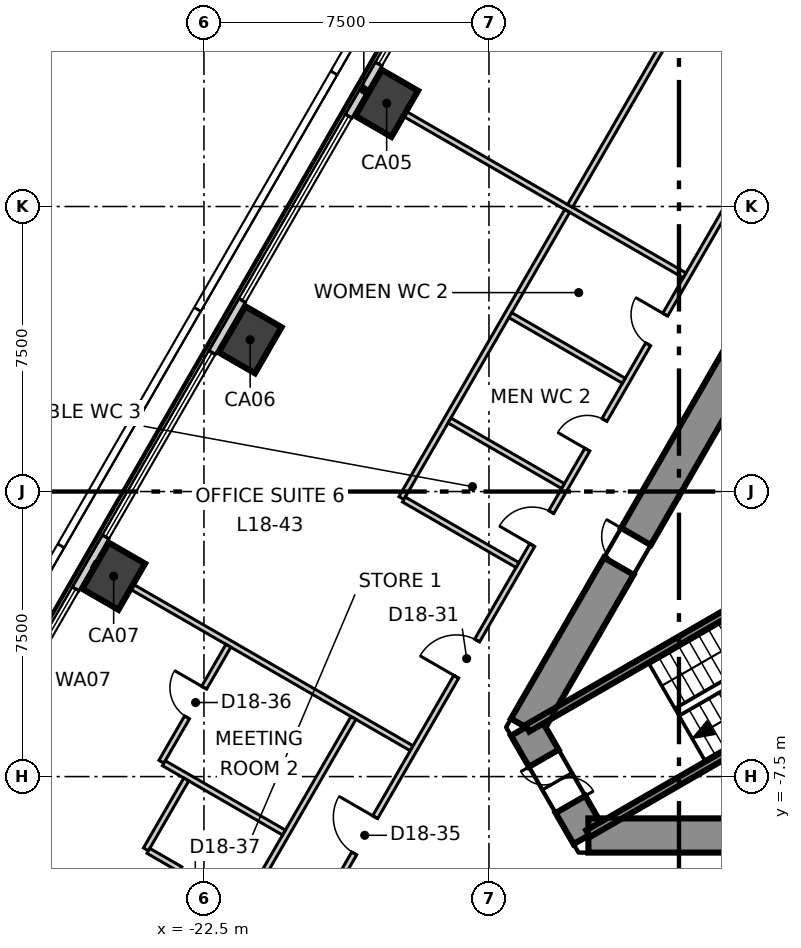
"""IFC4 building model, lengths in metres.
Left out: names, types, materials, properties, quantities, classifications, styles, units other than length and angle.
Written with IfcOpenShell. Run it as: python <this file> out.ifc"""

import sys

from ifc_helpers import new_model, si_unit, direction, frame, frame_2d, origin, origin_2d, place, context, subcontext, project, spatial, polyline, rectangle, outline, extrude, element, fill, save


model = new_model("IFC4")
c1 = context("Model", 3, precision=1e-05, world=origin(), true_north=direction((0.0, 1.0)))
c2 = subcontext(c1, "Body", "Model", "MODEL_VIEW")
j1 = project(units=[si_unit("LENGTHUNIT", "METRE"), si_unit("PLANEANGLEUNIT", "RADIAN")], contexts=[c1])
p1 = place(None, origin())
s1 = spatial("IfcSite", under=j1, at=p1, CompositionType="ELEMENT")
p2 = place(p1, origin())
s2 = spatial("IfcBuilding", under=s1, at=p2, CompositionType="ELEMENT")
p3 = place(p2, frame((0.0, 0.0, 83.3)))
s3 = spatial("IfcBuildingStorey", under=s2, at=p3, CompositionType="ELEMENT", Elevation=83.3)
p4 = place(p3, frame((-1.645, 15.25, -0.3), z_axis=(0.0, 0.0, 1.0), x_axis=(-0.500026485275, -0.866010111964, 0.0)))
e1 = element("IfcWall", 1, at=p4, inside=s3, PredefinedType="SHEAR", context=c2, shape_type="SweptSolid", body=[
    extrude(outline(polyline([(-0.26, -0.45), (1.685, -0.45), (3.63, -0.45), (5.576, -0.45), (7.521, -0.45), (9.466, -0.449), (11.411, -0.449), (13.357, -0.449), (15.302, -0.449), (17.247, -0.449), (19.192, -0.449), (21.138, -0.449), (23.083, -0.449), (25.028, -0.449), (24.509, 0.45), (22.644, 0.45), (20.778, 0.45), (18.913, 0.45), (17.048, 0.45), (15.182, 0.449), (13.317, 0.449), (11.452, 0.449), (9.587, 0.449), (7.721, 0.449), (5.856, 0.449), (3.991, 0.449), (2.125, 0.449), (0.26, 0.449), (-0.26, -0.45)])), origin(), (0.0, 0.0, 1.0), 4.0),
])
p5 = place(p4, frame((11.834, 0.0, 0.3)))
e2 = element("IfcOpeningElement", 2, at=p5, cuts=e1, PredefinedType="OPENING", context=c2, shape_type="SweptSolid", body=[
    extrude(rectangle(XDim=1.1, YDim=2.1, at=frame_2d((0.55, 1.05))), frame((0.0, 0.46, 0.0), z_axis=(0.0, -1.0, 0.0), x_axis=(1.0, 0.0, 0.0)), (0.0, 0.0, 1.0), 0.92),
])
p6 = place(p4, frame((18.976, 0.0, 0.3)))
e3 = element("IfcOpeningElement", 3, at=p6, cuts=e1, PredefinedType="OPENING", context=c2, shape_type="SweptSolid", body=[
    extrude(rectangle(XDim=0.9, YDim=2.1, at=frame_2d((0.45, 1.05))), frame((0.0, 0.46, 0.0), z_axis=(0.0, -1.0, 0.0), x_axis=(1.0, 0.0, 0.0)), (0.0, 0.0, 1.0), 0.92),
])
p7 = place(p3, frame((-14.03, -6.2, -0.3), z_axis=(0.0, 0.0, 1.0), x_axis=(0.500111984565, -0.865960739811, 0.0)))
e4 = element("IfcWall", 4, at=p7, inside=s3, PredefinedType="SHEAR", context=c2, shape_type="SweptSolid", body=[
    extrude(outline(polyline([(-0.26, -0.449), (1.646, -0.449), (3.551, -0.45), (3.032, 0.45), (1.646, 0.45), (0.26, 0.45), (-0.26, -0.449)])), origin(), (0.0, 0.0, 1.0), 4.0),
])
p8 = place(p7, frame((0.946, 0.0, 0.3)))
e5 = element("IfcOpeningElement", 5, at=p8, cuts=e4, PredefinedType="OPENING", context=c2, shape_type="SweptSolid", body=[
    extrude(rectangle(XDim=1.4, YDim=2.1, at=frame_2d((0.7, 1.05))), frame((0.0, 0.46, 0.0), z_axis=(0.0, -1.0, 0.0), x_axis=(1.0, 0.0, 0.0)), (0.0, 0.0, 1.0), 0.92),
])
p9 = place(p3, frame((-12.384, -9.05, -0.3), z_axis=(0.0, 0.0, 1.0), x_axis=(1.0, 0.0, 0.0)))
e6 = element("IfcWall", 6, at=p9, inside=s3, PredefinedType="SHEAR", context=c2, shape_type="SweptSolid", body=[
    extrude(outline(polyline([(-0.26, -0.45), (1.685, -0.45), (3.63, -0.45), (5.576, -0.45), (7.521, -0.45), (9.466, -0.45), (11.411, -0.45), (13.357, -0.45), (15.302, -0.45), (17.247, -0.45), (19.192, -0.45), (21.138, -0.45), (23.083, -0.45), (25.028, -0.45), (24.508, 0.45), (22.643, 0.45), (20.778, 0.45), (18.912, 0.45), (17.047, 0.45), (15.182, 0.45), (13.317, 0.45), (11.451, 0.45), (9.586, 0.45), (7.721, 0.45), (5.856, 0.45), (3.99, 0.45), (2.125, 0.45), (0.26, 0.45), (-0.26, -0.45)])), origin(), (0.0, 0.0, 1.0), 4.0),
])
p10 = place(p9, frame((4.05, 0.0, 0.3)))
e7 = element("IfcOpeningElement", 7, at=p10, cuts=e6, PredefinedType="OPENING", context=c2, shape_type="SweptSolid", body=[
    extrude(rectangle(XDim=0.9, YDim=2.1, at=frame_2d((0.45, 1.05))), frame((0.0, 0.46, 0.0), z_axis=(0.0, -1.0, 0.0), x_axis=(1.0, 0.0, 0.0)), (0.0, 0.0, 1.0), 0.92),
])
p11 = place(p9, frame((15.32, 0.0, 0.3)))
e8 = element("IfcOpeningElement", 8, at=p11, cuts=e6, PredefinedType="OPENING", context=c2, shape_type="SweptSolid", body=[
    extrude(rectangle(XDim=0.9, YDim=2.1, at=frame_2d((0.45, 1.05))), frame((0.0, 0.46, 0.0), z_axis=(0.0, -1.0, 0.0), x_axis=(1.0, 0.0, 0.0)), (0.0, 0.0, 1.0), 0.92),
])
for number, where, z_axis, x_axis in (
    (9, (-17.692, 10.214, -0.3), (0.0, 0.0, 1.0), (0.5, 0.866, 0.0)),
    (10, (-21.284, 3.993, -0.3), (0.0, 0.0, 1.0), (0.5, 0.866, 0.0)),
    (11, (-24.876, -2.228, -0.3), (0.0, 0.0, 1.0), (0.5, 0.866, 0.0)),
):
    element("IfcColumn", number, at=place(p3, frame(where, z_axis=z_axis, x_axis=x_axis)), inside=s3, PredefinedType="COLUMN", context=c2, shape_type="SweptSolid", body=[
        extrude(rectangle(XDim=1.4, YDim=1.1, at=origin_2d()), origin(), (0.0, 0.0, 1.0), 4.0),
    ])
p12 = place(p3, frame((-3.28, 36.577, 0.0), z_axis=(0.0, 0.0, 1.0), x_axis=(-0.500001635065, -0.866024459777, 0.0)))
e12 = element("IfcWall", 12, at=p12, inside=s3, PredefinedType="ELEMENTEDWALL", context=c2, shape_type="SweptSolid", body=[
    extrude(rectangle(XDim=60.053, YDim=0.2, at=frame_2d((30.027, 0.0))), origin(), (0.0, 0.0, 1.0), 3.7),
])
p13 = place(p12, frame((2.094, 0.0, 0.9)))
e13 = element("IfcOpeningElement", 13, at=p13, cuts=e12, PredefinedType="OPENING", context=c2, shape_type="SweptSolid", body=[
    extrude(rectangle(XDim=5.6, YDim=2.5, at=frame_2d((2.8, 1.25))), frame((0.0, 0.11, 0.0), z_axis=(0.0, -1.0, 0.0), x_axis=(1.0, 0.0, 0.0)), (0.0, 0.0, 1.0), 0.22),
])
p14 = place(p12, frame((9.278, 0.0, 0.9)))
e14 = element("IfcOpeningElement", 14, at=p14, cuts=e12, PredefinedType="OPENING", context=c2, shape_type="SweptSolid", body=[
    extrude(rectangle(XDim=5.6, YDim=2.5, at=frame_2d((2.8, 1.25))), frame((0.0, 0.11, 0.0), z_axis=(0.0, -1.0, 0.0), x_axis=(1.0, 0.0, 0.0)), (0.0, 0.0, 1.0), 0.22),
])
p15 = place(p12, frame((16.461, 0.0, 0.9)))
e15 = element("IfcOpeningElement", 15, at=p15, cuts=e12, PredefinedType="OPENING", context=c2, shape_type="SweptSolid", body=[
    extrude(rectangle(XDim=5.6, YDim=2.5, at=frame_2d((2.8, 1.25))), frame((0.0, 0.11, 0.0), z_axis=(0.0, -1.0, 0.0), x_axis=(1.0, 0.0, 0.0)), (0.0, 0.0, 1.0), 0.22),
])
p16 = place(p12, frame((23.645, 0.0, 0.9)))
e16 = element("IfcOpeningElement", 16, at=p16, cuts=e12, PredefinedType="OPENING", context=c2, shape_type="SweptSolid", body=[
    extrude(rectangle(XDim=5.6, YDim=2.5, at=frame_2d((2.8, 1.25))), frame((0.0, 0.11, 0.0), z_axis=(0.0, -1.0, 0.0), x_axis=(1.0, 0.0, 0.0)), (0.0, 0.0, 1.0), 0.22),
])
p17 = place(p12, frame((30.828, 0.0, 0.9)))
e17 = element("IfcOpeningElement", 17, at=p17, cuts=e12, PredefinedType="OPENING", context=c2, shape_type="SweptSolid", body=[
    extrude(rectangle(XDim=5.6, YDim=2.5, at=frame_2d((2.8, 1.25))), frame((0.0, 0.11, 0.0), z_axis=(0.0, -1.0, 0.0), x_axis=(1.0, 0.0, 0.0)), (0.0, 0.0, 1.0), 0.22),
])
p18 = place(p12, frame((38.012, 0.0, 0.9)))
e18 = element("IfcOpeningElement", 18, at=p18, cuts=e12, PredefinedType="OPENING", context=c2, shape_type="SweptSolid", body=[
    extrude(rectangle(XDim=5.6, YDim=2.5, at=frame_2d((2.8, 1.25))), frame((0.0, 0.11, 0.0), z_axis=(0.0, -1.0, 0.0), x_axis=(1.0, 0.0, 0.0)), (0.0, 0.0, 1.0), 0.22),
])
p19 = place(p12, frame((45.195, 0.0, 0.9)))
e19 = element("IfcOpeningElement", 19, at=p19, cuts=e12, PredefinedType="OPENING", context=c2, shape_type="SweptSolid", body=[
    extrude(rectangle(XDim=5.6, YDim=2.5, at=frame_2d((2.8, 1.25))), frame((0.0, 0.11, 0.0), z_axis=(0.0, -1.0, 0.0), x_axis=(1.0, 0.0, 0.0)), (0.0, 0.0, 1.0), 0.22),
])
p20 = place(p12, frame((52.379, 0.0, 0.9)))
e20 = element("IfcOpeningElement", 20, at=p20, cuts=e12, PredefinedType="OPENING", context=c2, shape_type="SweptSolid", body=[
    extrude(rectangle(XDim=5.6, YDim=2.5, at=frame_2d((2.8, 1.25))), frame((0.0, 0.11, 0.0), z_axis=(0.0, -1.0, 0.0), x_axis=(1.0, 0.0, 0.0)), (0.0, 0.0, 1.0), 0.22),
])
p21 = place(p3, frame((-25.413, -1.918, 0.0), z_axis=(0.0, 0.0, 1.0), x_axis=(0.866035557451, -0.499982412921, 0.0)))
e21 = element("IfcWall", 21, at=p21, inside=s3, PredefinedType="PARTITIONING", context=c2, shape_type="SweptSolid", body=[
    extrude(rectangle(XDim=9.674, YDim=0.15, at=frame_2d((4.837, 0.0))), origin(), (0.0, 0.0, 1.0), 3.7),
])
p22 = place(p3, frame((-19.497, -11.17, 0.0), z_axis=(0.0, 0.0, 1.0), x_axis=(0.499998854553, 0.866026065108, 0.0)))
e22 = element("IfcWall", 22, at=p22, inside=s3, PredefinedType="PARTITIONING", context=c2, shape_type="SweptSolid", body=[
    extrude(rectangle(XDim=38.994, YDim=0.15, at=frame_2d((19.497, 0.0))), origin(), (0.0, 0.0, 1.0), 3.7),
])
p23 = place(p22, frame((35.844, 0.0, 0.0)))
e23 = element("IfcOpeningElement", 23, at=p23, cuts=e22, PredefinedType="OPENING", context=c2, shape_type="SweptSolid", body=[
    extrude(rectangle(XDim=1.1, YDim=2.1, at=frame_2d((0.55, 1.05))), frame((0.0, 0.085, 0.0), z_axis=(0.0, -1.0, 0.0), x_axis=(1.0, 0.0, 0.0)), (0.0, 0.0, 1.0), 0.17),
])
p24 = place(p22, frame((26.04, 0.0, 0.0)))
e24 = element("IfcOpeningElement", 24, at=p24, cuts=e22, PredefinedType="OPENING", context=c2, shape_type="SweptSolid", body=[
    extrude(rectangle(XDim=1.1, YDim=2.1, at=frame_2d((0.55, 1.05))), frame((0.0, 0.085, 0.0), z_axis=(0.0, -1.0, 0.0), x_axis=(1.0, 0.0, 0.0)), (0.0, 0.0, 1.0), 0.17),
])
p25 = place(p22, frame((7.272, 0.0, 0.0)))
e25 = element("IfcOpeningElement", 25, at=p25, cuts=e22, PredefinedType="OPENING", context=c2, shape_type="SweptSolid", body=[
    extrude(rectangle(XDim=1.1, YDim=2.1, at=frame_2d((0.55, 1.05))), frame((0.0, 0.085, 0.0), z_axis=(0.0, -1.0, 0.0), x_axis=(1.0, 0.0, 0.0)), (0.0, 0.0, 1.0), 0.17),
])
p26 = place(p22, frame((17.372, 0.0, 0.0)))
e26 = element("IfcOpeningElement", 26, at=p26, cuts=e22, PredefinedType="OPENING", context=c2, shape_type="SweptSolid", body=[
    extrude(rectangle(XDim=0.9, YDim=2.1, at=frame_2d((0.45, 1.05))), frame((0.0, 0.085, 0.0), z_axis=(0.0, -1.0, 0.0), x_axis=(1.0, 0.0, 0.0)), (0.0, 0.0, 1.0), 0.17),
])
p27 = place(p22, frame((14.172, 0.0, 0.0)))
e27 = element("IfcOpeningElement", 27, at=p27, cuts=e22, PredefinedType="OPENING", context=c2, shape_type="SweptSolid", body=[
    extrude(rectangle(XDim=0.9, YDim=2.1, at=frame_2d((0.45, 1.05))), frame((0.0, 0.085, 0.0), z_axis=(0.0, -1.0, 0.0), x_axis=(1.0, 0.0, 0.0)), (0.0, 0.0, 1.0), 0.17),
])
p28 = place(p22, frame((11.272, 0.0, 0.0)))
e28 = element("IfcOpeningElement", 28, at=p28, cuts=e22, PredefinedType="OPENING", context=c2, shape_type="SweptSolid", body=[
    extrude(rectangle(XDim=1.0, YDim=2.1, at=frame_2d((0.5, 1.05))), frame((0.0, 0.085, 0.0), z_axis=(0.0, -1.0, 0.0), x_axis=(1.0, 0.0, 0.0)), (0.0, 0.0, 1.0), 0.17),
])
p29 = place(p22, frame((1.904, 0.0, 0.0)))
e29 = element("IfcOpeningElement", 29, at=p29, cuts=e22, PredefinedType="OPENING", context=c2, shape_type="SweptSolid", body=[
    extrude(rectangle(XDim=1.1, YDim=2.1, at=frame_2d((0.55, 1.05))), frame((0.0, 0.085, 0.0), z_axis=(0.0, -1.0, 0.0), x_axis=(1.0, 0.0, 0.0)), (0.0, 0.0, 1.0), 0.17),
])
p30 = place(p3, frame((-18.229, 10.524, 0.0), z_axis=(0.0, 0.0, 1.0), x_axis=(0.866029248602, -0.499993340521, 0.0)))
e30 = element("IfcWall", 30, at=p30, inside=s3, PredefinedType="PARTITIONING", context=c2, shape_type="SweptSolid", body=[
    extrude(rectangle(XDim=9.674, YDim=0.15, at=frame_2d((4.837, 0.0))), origin(), (0.0, 0.0, 1.0), 3.2),
])
p31 = place(p3, frame((-17.304, -0.171, 0.0), z_axis=(0.0, 0.0, 1.0), x_axis=(0.500054279689, 0.865994063124, 0.0)))
e31 = element("IfcWall", 31, at=p31, inside=s3, PredefinedType="PARTITIONING", context=c2, shape_type="SweptSolid", body=[
    extrude(rectangle(XDim=8.725, YDim=0.15, at=frame_2d((4.363, 0.0))), origin(), (0.0, 0.0, 1.0), 3.7),
])
for number, where, z_axis, x_axis in (
    (32, (-17.239, -0.209, 0.0), (0.0, 0.0, 1.0), (0.866, -0.5, 0.0)),
    (33, (-16.039, 1.87, 0.0), (0.0, 0.0, 1.0), (0.866, -0.5, 0.0)),
    (34, (-14.439, 4.641, 0.0), (0.0, 0.0, 1.0), (0.866, -0.5, 0.0)),
):
    element("IfcWall", number, at=place(p3, frame(where, z_axis=z_axis, x_axis=x_axis)), inside=s3, PredefinedType="PARTITIONING", context=c2, shape_type="SweptSolid", body=[
        extrude(rectangle(XDim=3.45, YDim=0.15, at=frame_2d((1.725, 0.0))), origin(), (0.0, 0.0, 1.0), 3.7),
    ])
p32 = place(p3, frame((-21.429, -10.916, 0.0), z_axis=(0.0, 0.0, 1.0), x_axis=(0.500069422629, 0.865985318901, 0.0)))
e35 = element("IfcWall", 35, at=p32, inside=s3, PredefinedType="PARTITIONING", context=c2, shape_type="SweptSolid", body=[
    extrude(rectangle(XDim=5.725, YDim=0.15, at=frame_2d((2.863, 0.0))), origin(), (0.0, 0.0, 1.0), 3.7),
])
p33 = place(p3, frame((-23.62, -7.11, 0.0), z_axis=(0.0, 0.0, 1.0), x_axis=(0.500236053335, 0.865889075427, 0.0)))
e36 = element("IfcWall", 36, at=p33, inside=s3, PredefinedType="PARTITIONING", context=c2, shape_type="SweptSolid", body=[
    extrude(rectangle(XDim=3.525, YDim=0.15, at=frame_2d((1.762, 0.0))), origin(), (0.0, 0.0, 1.0), 3.7),
])
p34 = place(p33, frame((1.35, 0.0, 0.0)))
e37 = element("IfcOpeningElement", 37, at=p34, cuts=e36, PredefinedType="OPENING", context=c2, shape_type="SweptSolid", body=[
    extrude(rectangle(XDim=0.9, YDim=2.1, at=frame_2d((0.45, 1.05))), frame((0.0, 0.085, 0.0), z_axis=(0.0, -1.0, 0.0), x_axis=(1.0, 0.0, 0.0)), (0.0, 0.0, 1.0), 0.17),
])
p35 = place(p3, frame((-23.555, -7.148, 0.0), z_axis=(0.0, 0.0, 1.0), x_axis=(0.866024069551, -0.500002310952, 0.0)))
e38 = element("IfcWall", 38, at=p35, inside=s3, PredefinedType="PARTITIONING", context=c2, shape_type="SweptSolid", body=[
    extrude(rectangle(XDim=3.65, YDim=0.15, at=frame_2d((1.825, 0.0))), origin(), (0.0, 0.0, 1.0), 3.7),
])
p36 = place(p3, frame((-24.027, -9.416, 0.0), z_axis=(0.0, 0.0, 1.0), x_axis=(0.500017365573, 0.866015377534, 0.0)))
e39 = element("IfcWall", 39, at=p36, inside=s3, PredefinedType="PARTITIONING", context=c2, shape_type="SweptSolid", body=[
    extrude(rectangle(XDim=2.126, YDim=0.15, at=frame_2d((1.063, 0.0))), origin(), (0.0, 0.0, 1.0), 3.7),
])
p37 = place(p3, frame((-23.962, -9.453, 0.0), z_axis=(0.0, 0.0, 1.0), x_axis=(0.866004402611, -0.500036373335, 0.0)))
e40 = element("IfcWall", 40, at=p37, inside=s3, PredefinedType="PARTITIONING", context=c2, shape_type="SweptSolid", body=[
    extrude(rectangle(XDim=2.85, YDim=0.15, at=frame_2d((1.425, 0.0))), origin(), (0.0, 0.0, 1.0), 3.7),
])
p38 = place(p37, frame((0.975, 0.0, 0.0)))
e41 = element("IfcOpeningElement", 41, at=p38, cuts=e40, PredefinedType="OPENING", context=c2, shape_type="SweptSolid", body=[
    extrude(rectangle(XDim=0.9, YDim=2.1, at=frame_2d((0.45, 1.05))), frame((0.0, 0.085, 0.0), z_axis=(0.0, -1.0, 0.0), x_axis=(1.0, 0.0, 0.0)), (0.0, 0.0, 1.0), 0.17),
])
p39 = place(p3, frame((-12.866, 7.515, 0.0), z_axis=(0.0, 0.0, 1.0), x_axis=(0.499947407797, 0.866055765778, 0.0)))
e42 = element("IfcWall", 42, at=p39, inside=s3, PredefinedType="PARTITIONING", context=c2, shape_type="SweptSolid", body=[
    extrude(rectangle(XDim=14.217, YDim=0.15, at=frame_2d((7.109, 0.0))), origin(), (0.0, 0.0, 1.0), 3.7),
])
p40 = place(p39, frame((6.642, 0.0, 0.0)))
e43 = element("IfcOpeningElement", 43, at=p40, cuts=e42, PredefinedType="OPENING", context=c2, shape_type="SweptSolid", body=[
    extrude(rectangle(XDim=1.0, YDim=2.1, at=frame_2d((0.5, 1.05))), frame((0.0, 0.085, 0.0), z_axis=(0.0, -1.0, 0.0), x_axis=(1.0, 0.0, 0.0)), (0.0, 0.0, 1.0), 0.17),
])
p41 = place(p3, frame((-13.99, -6.229, 0.0), z_axis=(0.0, 0.0, 1.0), x_axis=(0.866060059011, 0.499939970583, 0.0)))
e44 = element("IfcWall", 44, at=p41, inside=s3, PredefinedType="SOLIDWALL", context=c2, shape_type="SweptSolid", body=[
    extrude(rectangle(XDim=8.615, YDim=0.2, at=frame_2d((4.307, 0.0))), origin(), (0.0, 0.0, 1.0), 3.7),
])
p42 = place(p3, frame((-12.39, -9.001, 0.0), z_axis=(0.0, 0.0, 1.0), x_axis=(0.866010975815, 0.500024989144, 0.0)))
e45 = element("IfcWall", 45, at=p42, inside=s3, PredefinedType="SOLIDWALL", context=c2, shape_type="SweptSolid", body=[
    extrude(rectangle(XDim=8.615, YDim=0.2, at=frame_2d((4.308, 0.0))), origin(), (0.0, 0.0, 1.0), 3.7),
])
p43 = place(p16, origin())
e46 = element("IfcWindow", 46, at=p43, inside=s3, PartitioningType="SINGLE_PANEL", PredefinedType="WINDOW", context=c2, shape_type="SweptSolid", body=[
    extrude(rectangle(XDim=5.6, YDim=2.5, at=frame_2d((2.8, 1.25))), frame((0.0, 0.03, 0.0), z_axis=(0.0, -1.0, 0.0), x_axis=(1.0, 0.0, 0.0)), (0.0, 0.0, 1.0), 0.06),
])
fill(e16, e46)
p44 = place(p17, origin())
e47 = element("IfcWindow", 47, at=p44, inside=s3, PartitioningType="SINGLE_PANEL", PredefinedType="WINDOW", context=c2, shape_type="SweptSolid", body=[
    extrude(rectangle(XDim=5.6, YDim=2.5, at=frame_2d((2.8, 1.25))), frame((0.0, 0.03, 0.0), z_axis=(0.0, -1.0, 0.0), x_axis=(1.0, 0.0, 0.0)), (0.0, 0.0, 1.0), 0.06),
])
fill(e17, e47)
p45 = place(p18, origin())
e48 = element("IfcWindow", 48, at=p45, inside=s3, PartitioningType="SINGLE_PANEL", PredefinedType="WINDOW", context=c2, shape_type="SweptSolid", body=[
    extrude(rectangle(XDim=5.6, YDim=2.5, at=frame_2d((2.8, 1.25))), frame((0.0, 0.03, 0.0), z_axis=(0.0, -1.0, 0.0), x_axis=(1.0, 0.0, 0.0)), (0.0, 0.0, 1.0), 0.06),
])
fill(e18, e48)
p46 = place(p19, origin())
e49 = element("IfcWindow", 49, at=p46, inside=s3, PartitioningType="SINGLE_PANEL", PredefinedType="WINDOW", context=c2, shape_type="SweptSolid", body=[
    extrude(rectangle(XDim=5.6, YDim=2.5, at=frame_2d((2.8, 1.25))), frame((0.0, 0.03, 0.0), z_axis=(0.0, -1.0, 0.0), x_axis=(1.0, 0.0, 0.0)), (0.0, 0.0, 1.0), 0.06),
])
fill(e19, e49)
p47 = place(p25, origin())
e50 = element("IfcDoor", 50, at=p47, inside=s3, OperationType="SINGLE_SWING_RIGHT", PredefinedType="DOOR", context=c2, shape_type="SweptSolid", body=[
    extrude(rectangle(XDim=1.1, YDim=2.1, at=frame_2d((0.55, 1.05))), frame((0.0, 0.025, 0.0), z_axis=(0.0, -1.0, 0.0), x_axis=(1.0, 0.0, 0.0)), (0.0, 0.0, 1.0), 0.05),
])
fill(e25, e50)
p48 = place(p26, origin())
e51 = element("IfcDoor", 51, at=p48, inside=s3, OperationType="SINGLE_SWING_LEFT", PredefinedType="DOOR", context=c2, shape_type="SweptSolid", body=[
    extrude(rectangle(XDim=0.9, YDim=2.1, at=frame_2d((0.45, 1.05))), frame((0.0, 0.025, 0.0), z_axis=(0.0, -1.0, 0.0), x_axis=(1.0, 0.0, 0.0)), (0.0, 0.0, 1.0), 0.05),
])
fill(e26, e51)
p49 = place(p27, origin())
e52 = element("IfcDoor", 52, at=p49, inside=s3, OperationType="SINGLE_SWING_RIGHT", PredefinedType="DOOR", context=c2, shape_type="SweptSolid", body=[
    extrude(rectangle(XDim=0.9, YDim=2.1, at=frame_2d((0.45, 1.05))), frame((0.0, 0.025, 0.0), z_axis=(0.0, -1.0, 0.0), x_axis=(1.0, 0.0, 0.0)), (0.0, 0.0, 1.0), 0.05),
])
fill(e27, e52)
p50 = place(p28, origin())
e53 = element("IfcDoor", 53, at=p50, inside=s3, OperationType="SINGLE_SWING_RIGHT", PredefinedType="DOOR", context=c2, shape_type="SweptSolid", body=[
    extrude(rectangle(XDim=1.0, YDim=2.1, at=frame_2d((0.5, 1.05))), frame((0.0, 0.025, 0.0), z_axis=(0.0, -1.0, 0.0), x_axis=(1.0, 0.0, 0.0)), (0.0, 0.0, 1.0), 0.05),
])
fill(e28, e53)
p51 = place(p29, origin())
e54 = element("IfcDoor", 54, at=p51, inside=s3, OperationType="SINGLE_SWING_LEFT", PredefinedType="DOOR", context=c2, shape_type="SweptSolid", body=[
    extrude(rectangle(XDim=1.1, YDim=2.1, at=frame_2d((0.55, 1.05))), frame((0.0, 0.025, 0.0), z_axis=(0.0, -1.0, 0.0), x_axis=(1.0, 0.0, 0.0)), (0.0, 0.0, 1.0), 0.05),
])
fill(e29, e54)
p52 = place(p34, origin())
e55 = element("IfcDoor", 55, at=p52, inside=s3, OperationType="SINGLE_SWING_LEFT", PredefinedType="DOOR", context=c2, shape_type="SweptSolid", body=[
    extrude(rectangle(XDim=0.9, YDim=2.1, at=frame_2d((0.45, 1.05))), frame((0.0, 0.025, 0.0), z_axis=(0.0, -1.0, 0.0), x_axis=(1.0, 0.0, 0.0)), (0.0, 0.0, 1.0), 0.05),
])
fill(e37, e55)
p53 = place(p8, origin())
e56 = element("IfcDoor", 56, at=p53, inside=s3, OperationType="DOUBLE_DOOR_SINGLE_SWING", PredefinedType="DOOR", context=c2, shape_type="SweptSolid", body=[
    extrude(rectangle(XDim=1.4, YDim=2.1, at=frame_2d((0.7, 1.05))), frame((0.0, 0.025, 0.0), z_axis=(0.0, -1.0, 0.0), x_axis=(1.0, 0.0, 0.0)), (0.0, 0.0, 1.0), 0.05),
])
fill(e5, e56)
p54 = place(p6, origin())
e57 = element("IfcDoor", 57, at=p54, inside=s3, OperationType="SINGLE_SWING_LEFT", PredefinedType="DOOR", context=c2, shape_type="SweptSolid", body=[
    extrude(rectangle(XDim=0.9, YDim=2.1, at=frame_2d((0.45, 1.05))), frame((0.0, 0.025, 0.0), z_axis=(0.0, -1.0, 0.0), x_axis=(1.0, 0.0, 0.0)), (0.0, 0.0, 1.0), 0.05),
])
fill(e3, e57)
save(model, sys.argv[1])
